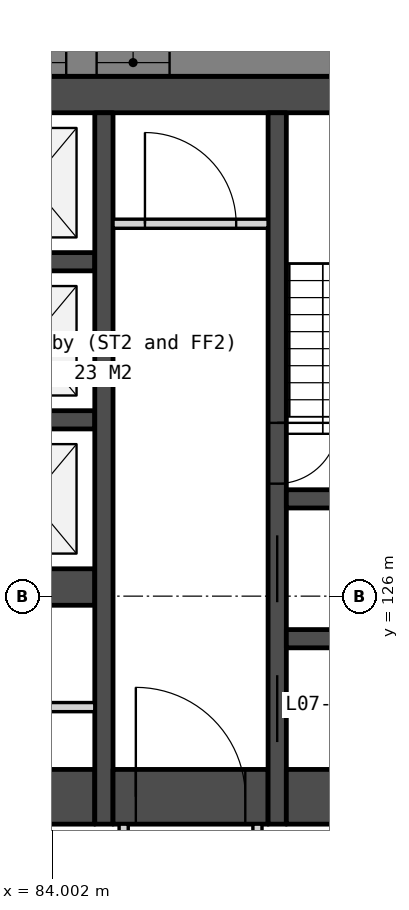
"""IFC4 building model, lengths in metres.
Left out: names, types, materials, properties, quantities, classifications, styles, units other than length and angle.
Written with IfcOpenShell. Run it as: python <this file> out.ifc"""

import sys

from ifc_helpers import new_model, si_unit, direction, frame, frame_2d, origin, place, context, subcontext, project, spatial, polyline, rectangle, outline, extrude, element, fill, save


model = new_model("IFC4")
c1 = context("Model", 3, precision=1e-05, world=origin(), true_north=direction((0.0, 1.0)))
c2 = subcontext(c1, "Body", "Model", "MODEL_VIEW")
j1 = project(units=[si_unit("LENGTHUNIT", "METRE"), si_unit("PLANEANGLEUNIT", "RADIAN")], contexts=[c1])
p1 = place(None, origin())
s1 = spatial("IfcSite", under=j1, at=p1, CompositionType="ELEMENT")
p2 = place(p1, origin())
s2 = spatial("IfcBuilding", under=s1, at=p2, CompositionType="ELEMENT")
p3 = place(p2, frame((0.0, 0.0, 38.5)))
s3 = spatial("IfcBuildingStorey", under=s2, at=p3, CompositionType="ELEMENT", Elevation=38.5)
p4 = place(p3, frame((66.0, 134.25, 0.0), z_axis=(0.0, 0.0, 1.0), x_axis=(1.0, 0.0, 0.0)))
e1 = element("IfcWall", 1, at=p4, inside=s3, PredefinedType="SOLIDWALL", context=c2, shape_type="SweptSolid", body=[
    extrude(rectangle(XDim=28.0, YDim=0.6, at=frame_2d((14.0, 0.0))), origin(), (0.0, 0.0, 1.0), 3.35),
])
p5 = place(p3, frame((81.8, 122.7, 0.0), z_axis=(0.0, 0.0, 1.0), x_axis=(1.0, 0.0, 0.0)))
e2 = element("IfcWall", 2, at=p5, inside=s3, PredefinedType="SOLIDWALL", context=c2, shape_type="SweptSolid", body=[
    extrude(rectangle(XDim=2.9, YDim=0.9, at=frame_2d((1.45, 0.0))), origin(), (0.0, 0.0, 1.0), 3.35),
])
p6 = place(p5, frame((0.05, 0.0, 0.0)))
e3 = element("IfcOpeningElement", 3, at=p6, cuts=e2, PredefinedType="OPENING", context=c2, shape_type="SweptSolid", body=[
    extrude(rectangle(XDim=1.5, YDim=2.1, at=frame_2d((0.75, 1.05))), frame((0.0, 0.46, 0.0), z_axis=(0.0, -1.0, 0.0), x_axis=(1.0, 0.0, 0.0)), (0.0, 0.0, 1.0), 0.92),
])
for number, where, z_axis, x_axis in (
    (4, (82.6, 131.5, 0.0), (0.0, 0.0, 1.0), (1.0, 0.0, 0.0)),
    (5, (82.6, 128.9, 0.0), (0.0, 0.0, 1.0), (1.0, 0.0, 0.0)),
):
    element("IfcWall", number, at=place(p3, frame(where, z_axis=z_axis, x_axis=x_axis)), inside=s3, PredefinedType="SOLIDWALL", context=c2, shape_type="SweptSolid", body=[
        extrude(rectangle(XDim=2.1, YDim=0.3, at=frame_2d((1.05, 0.0))), origin(), (0.0, 0.0, 1.0), 3.35),
    ])
p7 = place(p3, frame((82.6, 126.15, 0.0), z_axis=(0.0, 0.0, 1.0), x_axis=(1.0, 0.0, 0.0)))
e6 = element("IfcWall", 6, at=p7, inside=s3, PredefinedType="SOLIDWALL", context=c2, shape_type="SweptSolid", body=[
    extrude(rectangle(XDim=2.1, YDim=0.6, at=frame_2d((1.05, 0.0))), origin(), (0.0, 0.0, 1.0), 3.35),
])
p8 = place(p3, frame((83.35, 124.175, 0.0), z_axis=(0.0, 0.0, 1.0), x_axis=(1.0, 0.0, 0.0)))
e7 = element("IfcWall", 7, at=p8, inside=s3, PredefinedType="PARTITIONING", context=c2, shape_type="SweptSolid", body=[
    extrude(rectangle(XDim=1.35, YDim=0.15, at=frame_2d((0.675, 0.0))), origin(), (0.0, 0.0, 1.0), 3.35),
])
p9 = place(p3, frame((84.85, 133.95, 0.0), z_axis=(0.0, 0.0, 1.0), x_axis=(0.0, -1.0, 0.0)))
e8 = element("IfcWall", 8, at=p9, inside=s3, PredefinedType="SOLIDWALL", context=c2, shape_type="SweptSolid", body=[
    extrude(rectangle(XDim=11.7, YDim=0.3, at=frame_2d((5.85, 0.0))), origin(), (0.0, 0.0, 1.0), 3.35),
])
p10 = place(p3, frame((85.0, 132.125, 0.0), z_axis=(0.0, 0.0, 1.0), x_axis=(1.0, 0.0, 0.0)))
e9 = element("IfcWall", 9, at=p10, inside=s3, PredefinedType="PARTITIONING", context=c2, shape_type="SweptSolid", body=[
    extrude(rectangle(XDim=2.55, YDim=0.15, at=frame_2d((1.275, 0.0))), origin(), (0.0, 0.0, 1.0), 3.35),
])
p11 = place(p10, frame((0.525, 0.0, 0.0)))
e10 = element("IfcOpeningElement", 10, at=p11, cuts=e9, PredefinedType="OPENING", context=c2, shape_type="SweptSolid", body=[
    extrude(rectangle(XDim=1.5, YDim=2.1, at=frame_2d((0.75, 1.05))), frame((0.0, 0.085, 0.0), z_axis=(0.0, -1.0, 0.0), x_axis=(1.0, 0.0, 0.0)), (0.0, 0.0, 1.0), 0.17),
])
p12 = place(p3, frame((85.0, 122.7, 0.0), z_axis=(0.0, 0.0, 1.0), x_axis=(1.0, 0.0, 0.0)))
e11 = element("IfcWall", 11, at=p12, inside=s3, PredefinedType="SOLIDWALL", context=c2, shape_type="SweptSolid", body=[
    extrude(rectangle(XDim=2.55, YDim=0.9, at=frame_2d((1.275, 0.0))), origin(), (0.0, 0.0, 1.0), 3.35),
])
p13 = place(p12, frame((0.375, 0.0, 0.0)))
e12 = element("IfcOpeningElement", 12, at=p13, cuts=e11, PredefinedType="OPENING", context=c2, shape_type="SweptSolid", body=[
    extrude(rectangle(XDim=1.8, YDim=2.1, at=frame_2d((0.9, 1.05))), frame((0.0, 0.46, 0.0), z_axis=(0.0, -1.0, 0.0), x_axis=(1.0, 0.0, 0.0)), (0.0, 0.0, 1.0), 0.92),
])
p14 = place(p3, frame((85.175, 122.25, 0.0), z_axis=(0.0, 0.0, 1.0), x_axis=(0.0, -1.0, 0.0)))
e13 = element("IfcWall", 13, at=p14, inside=s3, PredefinedType="PARTITIONING", context=c2, shape_type="SweptSolid", body=[
    extrude(rectangle(XDim=2.1, YDim=0.15, at=frame_2d((1.05, 0.0))), origin(), (0.0, 0.0, 1.0), 3.35),
])
p15 = place(p14, frame((0.55, 0.0, 0.0)))
e14 = element("IfcOpeningElement", 14, at=p15, cuts=e13, PredefinedType="OPENING", context=c2, shape_type="SweptSolid", body=[
    extrude(rectangle(XDim=1.0, YDim=2.1, at=frame_2d((0.5, 1.05))), frame((0.0, 0.085, 0.0), z_axis=(0.0, -1.0, 0.0), x_axis=(1.0, 0.0, 0.0)), (0.0, 0.0, 1.0), 0.17),
])
p16 = place(p3, frame((87.375, 122.25, 0.0), z_axis=(0.0, 0.0, 1.0), x_axis=(0.0, -1.0, 0.0)))
e15 = element("IfcWall", 15, at=p16, inside=s3, PredefinedType="PARTITIONING", context=c2, shape_type="SweptSolid", body=[
    extrude(rectangle(XDim=2.1, YDim=0.15, at=frame_2d((1.05, 0.0))), origin(), (0.0, 0.0, 1.0), 3.35),
])
p17 = place(p3, frame((87.7, 133.95, 0.0), z_axis=(0.0, 0.0, 1.0), x_axis=(0.0, -1.0, 0.0)))
e16 = element("IfcWall", 16, at=p17, inside=s3, PredefinedType="SOLIDWALL", context=c2, shape_type="SweptSolid", body=[
    extrude(rectangle(XDim=11.7, YDim=0.3, at=frame_2d((5.85, 0.0))), origin(), (0.0, 0.0, 1.0), 3.35),
])
p18 = place(p17, frame((6.95, 0.0, 0.0)))
e17 = element("IfcOpeningElement", 17, at=p18, cuts=e16, PredefinedType="OPENING", context=c2, shape_type="SweptSolid", body=[
    extrude(rectangle(XDim=1.1, YDim=2.1, at=frame_2d((0.55, 1.05))), frame((0.0, 0.16, 0.0), z_axis=(0.0, -1.0, 0.0), x_axis=(1.0, 0.0, 0.0)), (0.0, 0.0, 1.0), 0.32),
])
p19 = place(p17, frame((5.1, 0.0, 0.0)))
e18 = element("IfcOpeningElement", 18, at=p19, cuts=e16, PredefinedType="OPENING", context=c2, shape_type="SweptSolid", body=[
    extrude(rectangle(XDim=1.0, YDim=2.1, at=frame_2d((0.5, 1.05))), frame((0.0, 0.16, 0.0), z_axis=(0.0, -1.0, 0.0), x_axis=(1.0, 0.0, 0.0)), (0.0, 0.0, 1.0), 0.32),
])
p20 = place(p17, frame((9.25, 0.0, 0.0)))
e19 = element("IfcOpeningElement", 19, at=p20, cuts=e16, PredefinedType="OPENING", context=c2, shape_type="SweptSolid", body=[
    extrude(rectangle(XDim=1.1, YDim=2.1, at=frame_2d((0.55, 1.05))), frame((0.0, 0.16, 0.0), z_axis=(0.0, -1.0, 0.0), x_axis=(1.0, 0.0, 0.0)), (0.0, 0.0, 1.0), 0.32),
])
for number, where, z_axis, x_axis in (
    (20, (87.85, 127.6, 0.0), (0.0, 0.0, 1.0), (1.0, 0.0, 0.0)),
    (21, (87.85, 125.3, 0.0), (0.0, 0.0, 1.0), (1.0, 0.0, 0.0)),
):
    element("IfcWall", number, at=place(p3, frame(where, z_axis=z_axis, x_axis=x_axis)), inside=s3, PredefinedType="SOLIDWALL", context=c2, shape_type="SweptSolid", body=[
        extrude(rectangle(XDim=2.55, YDim=0.3, at=frame_2d((1.275, 0.0))), origin(), (0.0, 0.0, 1.0), 3.35),
    ])
p21 = place(p3, frame((87.85, 122.7, 0.0), z_axis=(0.0, 0.0, 1.0), x_axis=(1.0, 0.0, 0.0)))
e22 = element("IfcWall", 22, at=p21, inside=s3, PredefinedType="SOLIDWALL", context=c2, shape_type="SweptSolid", body=[
    extrude(rectangle(XDim=2.55, YDim=0.9, at=frame_2d((1.275, 0.0))), origin(), (0.0, 0.0, 1.0), 3.35),
])
p22 = place(p3, frame((102.4, 134.775, -0.15), z_axis=(0.0, 0.0, 1.0), x_axis=(-1.0, 0.0, 0.0)))
e23 = element("IfcWall", 23, at=p22, inside=s3, PredefinedType="SOLIDWALL", context=c2, shape_type="SweptSolid", body=[
    extrude(outline(polyline([(44.8, 0.0), (44.8, 3.5), (0.0, 3.5), (0.0, 0.0), (44.8, 0.0)])), frame((0.0, 0.225, 0.0), z_axis=(0.0, -1.0, 0.0), x_axis=(1.0, 0.0, 0.0)), (0.0, 0.0, 1.0), 0.45),
])
p23 = place(p22, frame((0.722, 0.0, 1.05)))
e24 = element("IfcOpeningElement", 24, at=p23, cuts=e23, PredefinedType="OPENING", context=c2, shape_type="SweptSolid", body=[
    extrude(rectangle(XDim=1.2, YDim=1.5, at=frame_2d((0.6, 0.75))), frame((0.0, 0.235, 0.0), z_axis=(0.0, -1.0, 0.0), x_axis=(1.0, 0.0, 0.0)), (0.0, 0.0, 1.0), 0.47),
])
p24 = place(p22, frame((7.51, 0.0, 1.05)))
e25 = element("IfcOpeningElement", 25, at=p24, cuts=e23, PredefinedType="OPENING", context=c2, shape_type="SweptSolid", body=[
    extrude(rectangle(XDim=1.2, YDim=1.5, at=frame_2d((0.6, 0.75))), frame((0.0, 0.235, 0.0), z_axis=(0.0, -1.0, 0.0), x_axis=(1.0, 0.0, 0.0)), (0.0, 0.0, 1.0), 0.47),
])
p25 = place(p22, frame((9.21, 0.0, 1.05)))
e26 = element("IfcOpeningElement", 26, at=p25, cuts=e23, PredefinedType="OPENING", context=c2, shape_type="SweptSolid", body=[
    extrude(rectangle(XDim=1.2, YDim=1.5, at=frame_2d((0.6, 0.75))), frame((0.0, 0.235, 0.0), z_axis=(0.0, -1.0, 0.0), x_axis=(1.0, 0.0, 0.0)), (0.0, 0.0, 1.0), 0.47),
])
p26 = place(p22, frame((16.47, 0.0, 1.05)))
e27 = element("IfcOpeningElement", 27, at=p26, cuts=e23, PredefinedType="OPENING", context=c2, shape_type="SweptSolid", body=[
    extrude(rectangle(XDim=1.2, YDim=1.5, at=frame_2d((0.6, 0.75))), frame((0.0, 0.235, 0.0), z_axis=(0.0, -1.0, 0.0), x_axis=(1.0, 0.0, 0.0)), (0.0, 0.0, 1.0), 0.47),
])
p27 = place(p22, frame((18.17, 0.0, 1.05)))
e28 = element("IfcOpeningElement", 28, at=p27, cuts=e23, PredefinedType="OPENING", context=c2, shape_type="SweptSolid", body=[
    extrude(rectangle(XDim=1.2, YDim=1.5, at=frame_2d((0.6, 0.75))), frame((0.0, 0.235, 0.0), z_axis=(0.0, -1.0, 0.0), x_axis=(1.0, 0.0, 0.0)), (0.0, 0.0, 1.0), 0.47),
])
p28 = place(p22, frame((25.43, 0.0, 1.05)))
e29 = element("IfcOpeningElement", 29, at=p28, cuts=e23, PredefinedType="OPENING", context=c2, shape_type="SweptSolid", body=[
    extrude(rectangle(XDim=1.2, YDim=1.5, at=frame_2d((0.6, 0.75))), frame((0.0, 0.235, 0.0), z_axis=(0.0, -1.0, 0.0), x_axis=(1.0, 0.0, 0.0)), (0.0, 0.0, 1.0), 0.47),
])
p29 = place(p22, frame((27.13, 0.0, 1.05)))
e30 = element("IfcOpeningElement", 30, at=p29, cuts=e23, PredefinedType="OPENING", context=c2, shape_type="SweptSolid", body=[
    extrude(rectangle(XDim=1.2, YDim=1.5, at=frame_2d((0.6, 0.75))), frame((0.0, 0.235, 0.0), z_axis=(0.0, -1.0, 0.0), x_axis=(1.0, 0.0, 0.0)), (0.0, 0.0, 1.0), 0.47),
])
p30 = place(p22, frame((34.39, 0.0, 1.05)))
e31 = element("IfcOpeningElement", 31, at=p30, cuts=e23, PredefinedType="OPENING", context=c2, shape_type="SweptSolid", body=[
    extrude(rectangle(XDim=1.2, YDim=1.5, at=frame_2d((0.6, 0.75))), frame((0.0, 0.235, 0.0), z_axis=(0.0, -1.0, 0.0), x_axis=(1.0, 0.0, 0.0)), (0.0, 0.0, 1.0), 0.47),
])
p31 = place(p22, frame((36.09, 0.0, 1.05)))
e32 = element("IfcOpeningElement", 32, at=p31, cuts=e23, PredefinedType="OPENING", context=c2, shape_type="SweptSolid", body=[
    extrude(rectangle(XDim=1.2, YDim=1.5, at=frame_2d((0.6, 0.75))), frame((0.0, 0.235, 0.0), z_axis=(0.0, -1.0, 0.0), x_axis=(1.0, 0.0, 0.0)), (0.0, 0.0, 1.0), 0.47),
])
p32 = place(p22, frame((42.878, 0.0, 1.05)))
e33 = element("IfcOpeningElement", 33, at=p32, cuts=e23, PredefinedType="OPENING", context=c2, shape_type="SweptSolid", body=[
    extrude(rectangle(XDim=1.2, YDim=1.5, at=frame_2d((0.6, 0.75))), frame((0.0, 0.235, 0.0), z_axis=(0.0, -1.0, 0.0), x_axis=(1.0, 0.0, 0.0)), (0.0, 0.0, 1.0), 0.47),
])
p33 = place(p3, frame((83.105, 90.599, -0.15), z_axis=(0.0, 0.0, 1.0), x_axis=(0.499999201451, 0.866025864826, 0.0)))
e34 = element("IfcWall", 34, at=p33, inside=s3, PredefinedType="SOLIDWALL", context=c2, shape_type="SweptSolid", body=[
    extrude(outline(polyline([(44.8, 0.0), (44.8, 3.5), (0.0, 3.5), (0.0, 0.0), (44.8, 0.0)])), frame((0.0, 0.225, 0.0), z_axis=(0.0, -1.0, 0.0), x_axis=(1.0, 0.0, 0.0)), (0.0, 0.0, 1.0), 0.45),
])
p34 = place(p33, frame((0.722, 0.0, 1.05)))
e35 = element("IfcOpeningElement", 35, at=p34, cuts=e34, PredefinedType="OPENING", context=c2, shape_type="SweptSolid", body=[
    extrude(rectangle(XDim=1.2, YDim=1.5, at=frame_2d((0.6, 0.75))), frame((0.0, 0.235, 0.0), z_axis=(0.0, -1.0, 0.0), x_axis=(1.0, 0.0, 0.0)), (0.0, 0.0, 1.0), 0.47),
])
p35 = place(p33, frame((7.51, 0.0, 1.05)))
e36 = element("IfcOpeningElement", 36, at=p35, cuts=e34, PredefinedType="OPENING", context=c2, shape_type="SweptSolid", body=[
    extrude(rectangle(XDim=1.2, YDim=1.5, at=frame_2d((0.6, 0.75))), frame((0.0, 0.235, 0.0), z_axis=(0.0, -1.0, 0.0), x_axis=(1.0, 0.0, 0.0)), (0.0, 0.0, 1.0), 0.47),
])
p36 = place(p33, frame((9.21, 0.0, 1.05)))
e37 = element("IfcOpeningElement", 37, at=p36, cuts=e34, PredefinedType="OPENING", context=c2, shape_type="SweptSolid", body=[
    extrude(rectangle(XDim=1.2, YDim=1.5, at=frame_2d((0.6, 0.75))), frame((0.0, 0.235, 0.0), z_axis=(0.0, -1.0, 0.0), x_axis=(1.0, 0.0, 0.0)), (0.0, 0.0, 1.0), 0.47),
])
p37 = place(p33, frame((16.47, 0.0, 1.05)))
e38 = element("IfcOpeningElement", 38, at=p37, cuts=e34, PredefinedType="OPENING", context=c2, shape_type="SweptSolid", body=[
    extrude(rectangle(XDim=1.2, YDim=1.5, at=frame_2d((0.6, 0.75))), frame((0.0, 0.235, 0.0), z_axis=(0.0, -1.0, 0.0), x_axis=(1.0, 0.0, 0.0)), (0.0, 0.0, 1.0), 0.47),
])
p38 = place(p33, frame((18.17, 0.0, 1.05)))
e39 = element("IfcOpeningElement", 39, at=p38, cuts=e34, PredefinedType="OPENING", context=c2, shape_type="SweptSolid", body=[
    extrude(rectangle(XDim=1.2, YDim=1.5, at=frame_2d((0.6, 0.75))), frame((0.0, 0.235, 0.0), z_axis=(0.0, -1.0, 0.0), x_axis=(1.0, 0.0, 0.0)), (0.0, 0.0, 1.0), 0.47),
])
p39 = place(p33, frame((25.43, 0.0, 1.05)))
e40 = element("IfcOpeningElement", 40, at=p39, cuts=e34, PredefinedType="OPENING", context=c2, shape_type="SweptSolid", body=[
    extrude(rectangle(XDim=1.2, YDim=1.5, at=frame_2d((0.6, 0.75))), frame((0.0, 0.235, 0.0), z_axis=(0.0, -1.0, 0.0), x_axis=(1.0, 0.0, 0.0)), (0.0, 0.0, 1.0), 0.47),
])
p40 = place(p33, frame((27.13, 0.0, 1.05)))
e41 = element("IfcOpeningElement", 41, at=p40, cuts=e34, PredefinedType="OPENING", context=c2, shape_type="SweptSolid", body=[
    extrude(rectangle(XDim=1.2, YDim=1.5, at=frame_2d((0.6, 0.75))), frame((0.0, 0.235, 0.0), z_axis=(0.0, -1.0, 0.0), x_axis=(1.0, 0.0, 0.0)), (0.0, 0.0, 1.0), 0.47),
])
p41 = place(p33, frame((34.39, 0.0, 1.05)))
e42 = element("IfcOpeningElement", 42, at=p41, cuts=e34, PredefinedType="OPENING", context=c2, shape_type="SweptSolid", body=[
    extrude(rectangle(XDim=1.2, YDim=1.5, at=frame_2d((0.6, 0.75))), frame((0.0, 0.235, 0.0), z_axis=(0.0, -1.0, 0.0), x_axis=(1.0, 0.0, 0.0)), (0.0, 0.0, 1.0), 0.47),
])
p42 = place(p33, frame((36.09, 0.0, 1.05)))
e43 = element("IfcOpeningElement", 43, at=p42, cuts=e34, PredefinedType="OPENING", context=c2, shape_type="SweptSolid", body=[
    extrude(rectangle(XDim=1.2, YDim=1.5, at=frame_2d((0.6, 0.75))), frame((0.0, 0.235, 0.0), z_axis=(0.0, -1.0, 0.0), x_axis=(1.0, 0.0, 0.0)), (0.0, 0.0, 1.0), 0.47),
])
p43 = place(p33, frame((42.878, 0.0, 1.05)))
e44 = element("IfcOpeningElement", 44, at=p43, cuts=e34, PredefinedType="OPENING", context=c2, shape_type="SweptSolid", body=[
    extrude(rectangle(XDim=1.2, YDim=1.5, at=frame_2d((0.6, 0.75))), frame((0.0, 0.235, 0.0), z_axis=(0.0, -1.0, 0.0), x_axis=(1.0, 0.0, 0.0)), (0.0, 0.0, 1.0), 0.47),
])
p44 = place(p18, origin())
e45 = element("IfcDoor", 45, at=p44, inside=s3, OperationType="SLIDING_TO_LEFT", PredefinedType="DOOR", context=c2, shape_type="SweptSolid", body=[
    extrude(rectangle(XDim=1.1, YDim=2.1, at=frame_2d((0.55, 1.05))), frame((0.0, 0.025, 0.0), z_axis=(0.0, -1.0, 0.0), x_axis=(1.0, 0.0, 0.0)), (0.0, 0.0, 1.0), 0.05),
])
fill(e17, e45)
p45 = place(p13, origin())
e46 = element("IfcDoor", 46, at=p45, inside=s3, OperationType="DOUBLE_DOOR_DOUBLE_SWING", PredefinedType="DOOR", context=c2, shape_type="SweptSolid", body=[
    extrude(rectangle(XDim=1.8, YDim=2.1, at=frame_2d((0.9, 1.05))), frame((0.0, 0.025, 0.0), z_axis=(0.0, -1.0, 0.0), x_axis=(1.0, 0.0, 0.0)), (0.0, 0.0, 1.0), 0.05),
])
fill(e12, e46)
p46 = place(p11, origin())
e47 = element("IfcDoor", 47, at=p46, inside=s3, OperationType="DOUBLE_DOOR_DOUBLE_SWING", PredefinedType="DOOR", context=c2, shape_type="SweptSolid", body=[
    extrude(rectangle(XDim=1.5, YDim=2.1, at=frame_2d((0.75, 1.05))), frame((0.0, 0.025, 0.0), z_axis=(0.0, -1.0, 0.0), x_axis=(1.0, 0.0, 0.0)), (0.0, 0.0, 1.0), 0.05),
])
fill(e10, e47)
p47 = place(p19, origin())
e48 = element("IfcDoor", 48, at=p47, inside=s3, OperationType="SINGLE_SWING_LEFT", PredefinedType="DOOR", context=c2, shape_type="SweptSolid", body=[
    extrude(rectangle(XDim=1.0, YDim=2.1, at=frame_2d((0.5, 1.05))), frame((0.0, 0.025, 0.0), z_axis=(0.0, -1.0, 0.0), x_axis=(1.0, 0.0, 0.0)), (0.0, 0.0, 1.0), 0.05),
])
fill(e18, e48)
p48 = place(p20, origin())
e49 = element("IfcDoor", 49, at=p48, inside=s3, OperationType="SLIDING_TO_LEFT", PredefinedType="DOOR", context=c2, shape_type="SweptSolid", body=[
    extrude(rectangle(XDim=1.1, YDim=2.1, at=frame_2d((0.55, 1.05))), frame((0.0, 0.025, 0.0), z_axis=(0.0, -1.0, 0.0), x_axis=(1.0, 0.0, 0.0)), (0.0, 0.0, 1.0), 0.05),
])
fill(e19, e49)
p49 = place(p26, origin())
e50 = element("IfcWindow", 50, at=p49, inside=s3, PartitioningType="SINGLE_PANEL", PredefinedType="WINDOW", context=c2, shape_type="SweptSolid", body=[
    extrude(rectangle(XDim=1.2, YDim=1.5, at=frame_2d((0.6, 0.75))), frame((0.0, 0.03, 0.0), z_axis=(0.0, -1.0, 0.0), x_axis=(1.0, 0.0, 0.0)), (0.0, 0.0, 1.0), 0.06),
])
fill(e27, e50)
p50 = place(p27, origin())
e51 = element("IfcWindow", 51, at=p50, inside=s3, PartitioningType="SINGLE_PANEL", PredefinedType="WINDOW", context=c2, shape_type="SweptSolid", body=[
    extrude(rectangle(XDim=1.2, YDim=1.5, at=frame_2d((0.6, 0.75))), frame((0.0, 0.03, 0.0), z_axis=(0.0, -1.0, 0.0), x_axis=(1.0, 0.0, 0.0)), (0.0, 0.0, 1.0), 0.06),
])
fill(e28, e51)
save(model, sys.argv[1])
